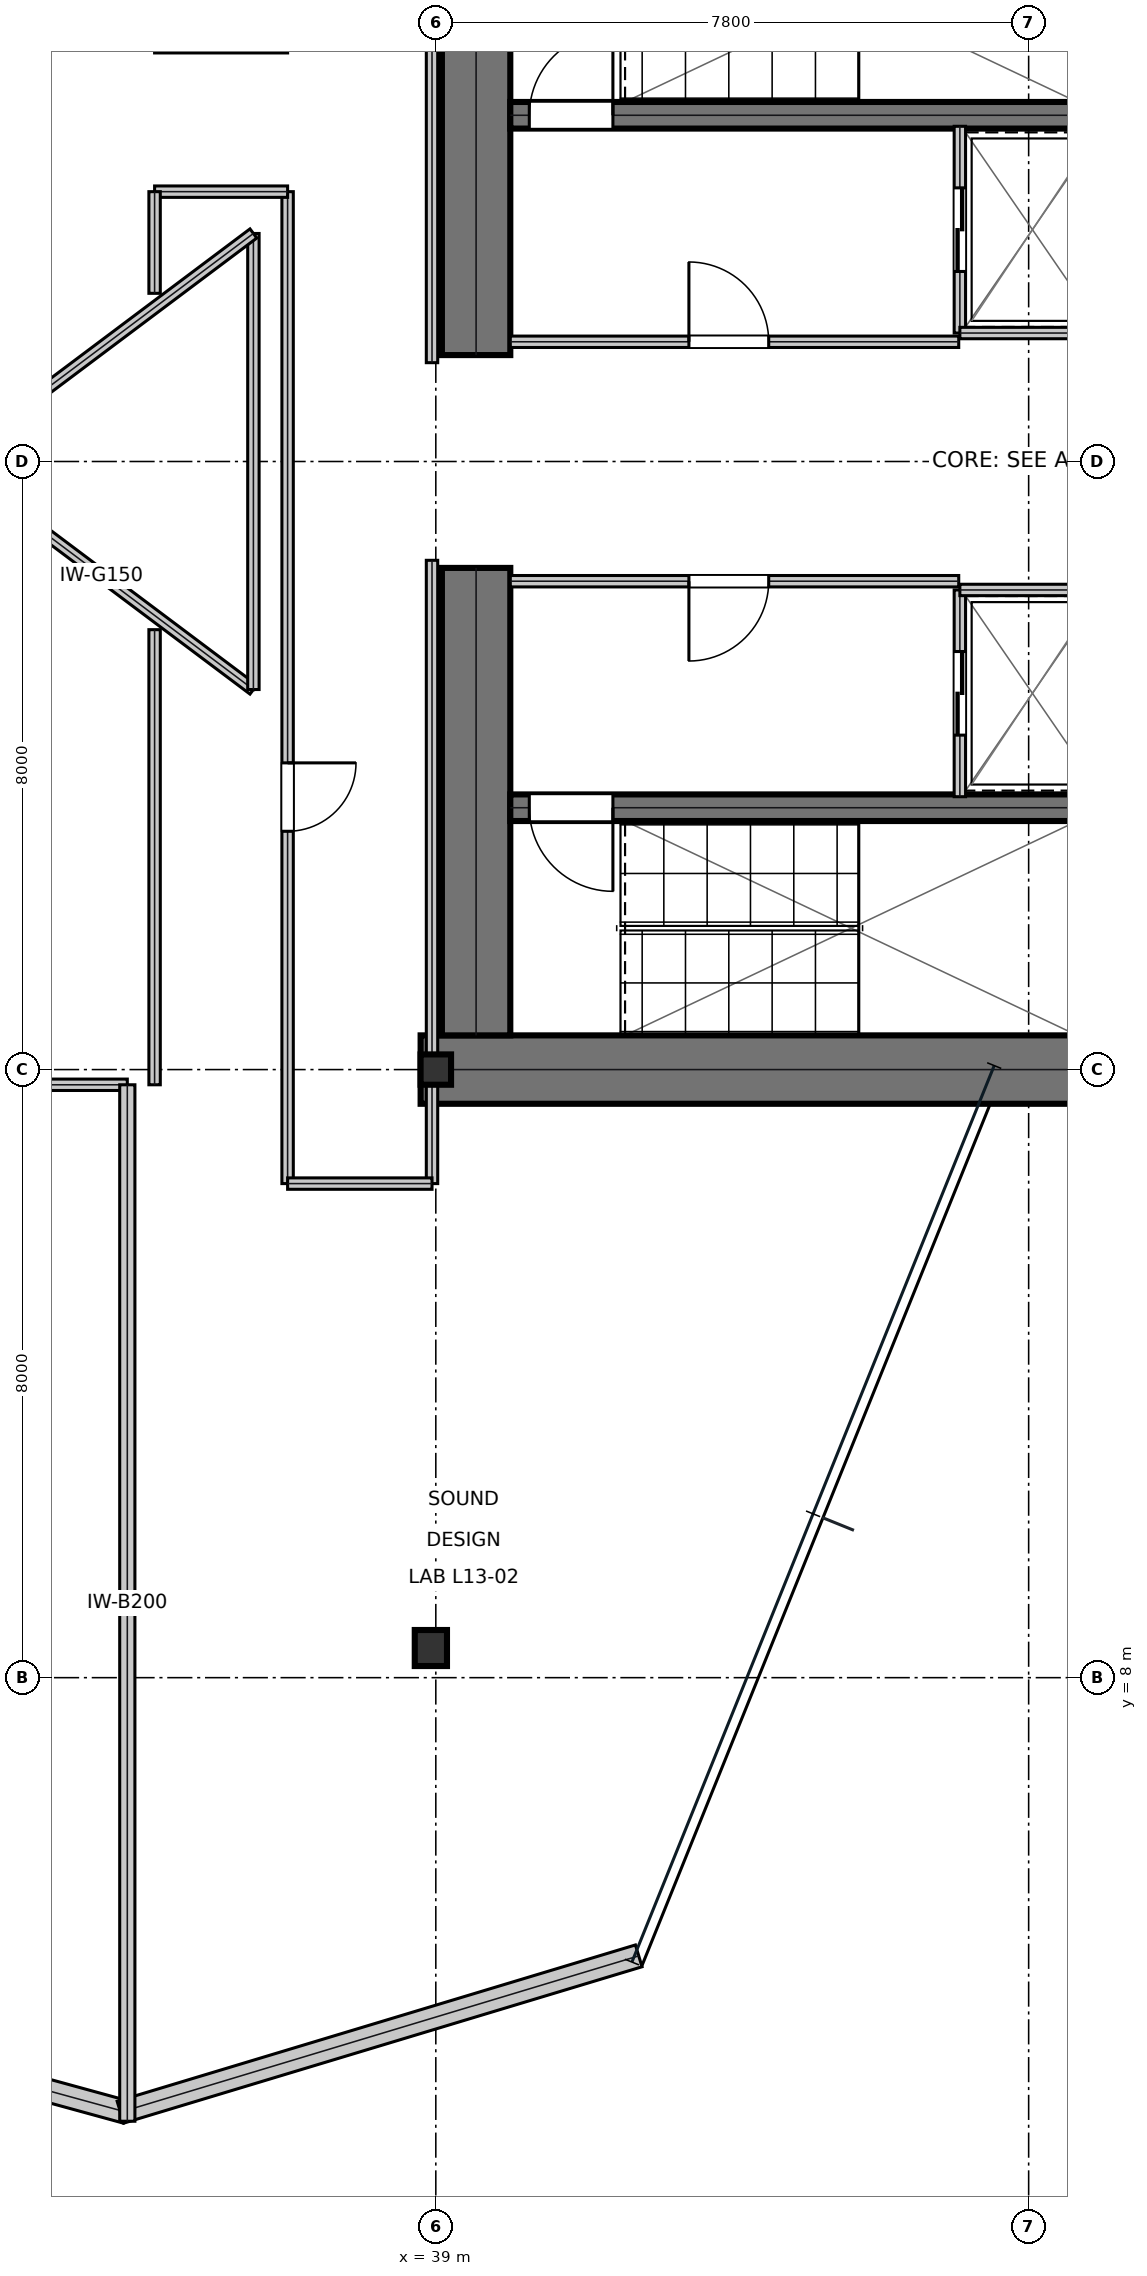
"""IFC4 building model, lengths in metres.
Left out: names, types, materials, properties, quantities, classifications, styles, units other than length and angle.
Written with IfcOpenShell. Run it as: python <this file> out.ifc"""

import sys

from ifc_helpers import new_model, si_unit, direction, frame, frame_2d, origin, origin_2d, place, context, subcontext, project, spatial, rectangle, i_section, extrude, element, fill, save


model = new_model("IFC4")
c1 = context("Model", 3, precision=1e-05, world=origin(), true_north=direction((0.0, 1.0)))
c2 = subcontext(c1, "Body", "Model", "MODEL_VIEW")
j1 = project(units=[si_unit("LENGTHUNIT", "METRE"), si_unit("PLANEANGLEUNIT", "RADIAN")], contexts=[c1])
p1 = place(None, origin())
s1 = spatial("IfcSite", under=j1, at=p1, CompositionType="ELEMENT")
p2 = place(p1, origin())
s2 = spatial("IfcBuilding", under=s1, at=p2, CompositionType="ELEMENT")
p3 = place(p2, frame((0.0, 0.0, 62.1)))
s3 = spatial("IfcBuildingStorey", under=s2, at=p3, CompositionType="ELEMENT", Elevation=62.1)
p4 = place(p3, frame((38.8, 16.0, 0.0), z_axis=(0.0, 0.0, 1.0), x_axis=(1.0, 0.0, 0.0)))
e1 = element("IfcWall", 1, at=p4, inside=s3, PredefinedType="SHEAR", context=c2, shape_type="SweptSolid", body=[
    extrude(rectangle(XDim=16.0, YDim=0.9, at=frame_2d((8.0, 0.0))), origin(), (0.0, 0.0, 1.0), 3.81),
])
for number, where, z_axis, x_axis in (
    (2, (39.53, 16.45, 0.0), (0.0, 0.0, 1.0), (0.0, 1.0, 0.0)),
    (3, (39.53, 25.4, 0.0), (0.0, 0.0, 1.0), (0.0, 1.0, 0.0)),
):
    element("IfcWall", number, at=place(p3, frame(where, z_axis=z_axis, x_axis=x_axis)), inside=s3, PredefinedType="SHEAR", context=c2, shape_type="SweptSolid", body=[
        extrude(rectangle(XDim=6.15, YDim=0.9, at=frame_2d((3.075, 0.0))), origin(), (0.0, 0.0, 1.0), 3.81),
    ])
p5 = place(p3, frame((39.98, 28.555, 0.0), z_axis=(0.0, 0.0, 1.0), x_axis=(1.0, 0.0, 0.0)))
e4 = element("IfcWall", 4, at=p5, inside=s3, PredefinedType="SHEAR", context=c2, shape_type="SweptSolid", body=[
    extrude(rectangle(XDim=7.71, YDim=0.35, at=frame_2d((3.855, 0.0))), origin(), (0.0, 0.0, 1.0), 3.81),
])
p6 = place(p5, frame((0.25, 0.0, 0.0)))
e5 = element("IfcOpeningElement", 5, at=p6, cuts=e4, PredefinedType="OPENING", context=c2, shape_type="SweptSolid", body=[
    extrude(rectangle(XDim=1.1, YDim=2.15, at=frame_2d((0.55, 1.075))), frame((0.0, 0.185, 0.0), z_axis=(0.0, -1.0, 0.0), x_axis=(1.0, 0.0, 0.0)), (0.0, 0.0, 1.0), 0.37),
])
p7 = place(p3, frame((39.98, 19.445, 0.0), z_axis=(0.0, 0.0, 1.0), x_axis=(1.0, 0.0, 0.0)))
e6 = element("IfcWall", 6, at=p7, inside=s3, PredefinedType="SHEAR", context=c2, shape_type="SweptSolid", body=[
    extrude(rectangle(XDim=7.71, YDim=0.35, at=frame_2d((3.855, 0.0))), origin(), (0.0, 0.0, 1.0), 3.81),
])
p8 = place(p7, frame((0.25, 0.0, 0.0)))
e7 = element("IfcOpeningElement", 7, at=p8, cuts=e6, PredefinedType="OPENING", context=c2, shape_type="SweptSolid", body=[
    extrude(rectangle(XDim=1.1, YDim=2.15, at=frame_2d((0.55, 1.075))), frame((0.0, 0.185, 0.0), z_axis=(0.0, -1.0, 0.0), x_axis=(1.0, 0.0, 0.0)), (0.0, 0.0, 1.0), 0.37),
])
p9 = place(p3, frame((39.0, 16.0, 0.0), z_axis=(0.0, 0.0, 1.0), x_axis=(1.0, 0.0, 0.0)))
e8 = element("IfcColumn", 8, at=p9, inside=s3, PredefinedType="COLUMN", context=c2, shape_type="SweptSolid", body=[
    extrude(i_section(OverallWidth=0.401, OverallDepth=0.399, WebThickness=0.025, FlangeThickness=0.04, at=origin_2d()), origin(), (0.0, 0.0, 1.0), 4.044),
])
p10 = place(p3, frame((38.935, 8.39, 0.016), z_axis=(0.0, 0.0, 1.0), x_axis=(1.0, 0.0, 0.0)))
e9 = element("IfcColumn", 9, at=p10, inside=s3, PredefinedType="COLUMN", context=c2, shape_type="SweptSolid", body=[
    extrude(i_section(OverallWidth=0.424, OverallDepth=0.474, WebThickness=0.048, FlangeThickness=0.077, at=origin_2d()), origin(), (0.0, 0.0, 1.0), 4.018),
])
p11 = place(p3, frame((28.109, 4.154, 0.0), z_axis=(0.0, 0.0, 1.0), x_axis=(0.96439075506, -0.264481514581, 0.0)))
e10 = element("IfcWall", 10, at=p11, inside=s3, PredefinedType="STANDARD", context=c2, shape_type="SweptSolid", body=[
    extrude(rectangle(XDim=7.071, YDim=0.3, at=frame_2d((3.535, 0.0))), origin(), (0.0, 0.0, 1.0), 3.81),
])
p12 = place(p3, frame((34.851, 2.283, 0.0), z_axis=(0.0, 0.0, 1.0), x_axis=(0.957387451844, 0.288806625707, 0.0)))
e11 = element("IfcWall", 11, at=p12, inside=s3, PredefinedType="STANDARD", context=c2, shape_type="SweptSolid", body=[
    extrude(rectangle(XDim=7.123, YDim=0.3, at=frame_2d((3.562, 0.0))), origin(), (0.0, 0.0, 1.0), 3.81),
])
p13 = place(p3, frame((39.98, 25.575, 0.0), z_axis=(0.0, 0.0, 1.0), x_axis=(1.0, 0.0, 0.0)))
e12 = element("IfcWall", 12, at=p13, inside=s3, PredefinedType="PARTITIONING", context=c2, shape_type="SweptSolid", body=[
    extrude(rectangle(XDim=5.9, YDim=0.15, at=frame_2d((2.95, 0.0))), origin(), (0.0, 0.0, 1.0), 3.81),
])
p14 = place(p13, frame((2.35, 0.0, 0.0)))
e13 = element("IfcOpeningElement", 13, at=p14, cuts=e12, PredefinedType="OPENING", context=c2, shape_type="SweptSolid", body=[
    extrude(rectangle(XDim=1.05, YDim=2.15, at=frame_2d((0.525, 1.075))), frame((0.0, 0.085, 0.0), z_axis=(0.0, -1.0, 0.0), x_axis=(1.0, 0.0, 0.0)), (0.0, 0.0, 1.0), 0.17),
])
p15 = place(p3, frame((39.98, 22.425, 0.0), z_axis=(0.0, 0.0, 1.0), x_axis=(1.0, 0.0, 0.0)))
e14 = element("IfcWall", 14, at=p15, inside=s3, PredefinedType="PARTITIONING", context=c2, shape_type="SweptSolid", body=[
    extrude(rectangle(XDim=5.9, YDim=0.15, at=frame_2d((2.95, 0.0))), origin(), (0.0, 0.0, 1.0), 3.81),
])
p16 = place(p15, frame((2.35, 0.0, 0.0)))
e15 = element("IfcOpeningElement", 15, at=p16, cuts=e14, PredefinedType="OPENING", context=c2, shape_type="SweptSolid", body=[
    extrude(rectangle(XDim=1.05, YDim=2.15, at=frame_2d((0.525, 1.075))), frame((0.0, 0.085, 0.0), z_axis=(0.0, -1.0, 0.0), x_axis=(1.0, 0.0, 0.0)), (0.0, 0.0, 1.0), 0.17),
])
p17 = place(p3, frame((45.895, 25.69, 0.0), z_axis=(0.0, 0.0, 1.0), x_axis=(0.0, 1.0, 0.0)))
e16 = element("IfcWall", 16, at=p17, inside=s3, PredefinedType="PARTITIONING", context=c2, shape_type="SweptSolid", body=[
    extrude(rectangle(XDim=2.72, YDim=0.15, at=frame_2d((1.36, 0.0))), origin(), (0.0, 0.0, 1.0), 3.81),
])
p18 = place(p17, frame((0.81, 0.0, 0.0)))
e17 = element("IfcOpeningElement", 17, at=p18, cuts=e16, PredefinedType="OPENING", context=c2, shape_type="SweptSolid", body=[
    extrude(rectangle(XDim=1.1, YDim=2.15, at=frame_2d((0.55, 1.075))), frame((0.0, 0.085, 0.0), z_axis=(0.0, -1.0, 0.0), x_axis=(1.0, 0.0, 0.0)), (0.0, 0.0, 1.0), 0.17),
])
p19 = place(p3, frame((45.895, 25.69, 0.0), z_axis=(0.0, 0.0, 1.0), x_axis=(1.0, 0.0, 0.0)))
e18 = element("IfcWall", 18, at=p19, inside=s3, PredefinedType="PARTITIONING", context=c2, shape_type="SweptSolid", body=[
    extrude(rectangle(XDim=1.915, YDim=0.15, at=frame_2d((0.958, 0.0))), origin(), (0.0, 0.0, 1.0), 3.81),
])
p20 = place(p3, frame((45.895, 19.59, 0.0), z_axis=(0.0, 0.0, 1.0), x_axis=(0.0, 1.0, 0.0)))
e19 = element("IfcWall", 19, at=p20, inside=s3, PredefinedType="PARTITIONING", context=c2, shape_type="SweptSolid", body=[
    extrude(rectangle(XDim=2.72, YDim=0.15, at=frame_2d((1.36, 0.0))), origin(), (0.0, 0.0, 1.0), 3.81),
])
p21 = place(p20, frame((0.81, 0.0, 0.0)))
e20 = element("IfcOpeningElement", 20, at=p21, cuts=e19, PredefinedType="OPENING", context=c2, shape_type="SweptSolid", body=[
    extrude(rectangle(XDim=1.1, YDim=2.15, at=frame_2d((0.55, 1.075))), frame((0.0, 0.085, 0.0), z_axis=(0.0, -1.0, 0.0), x_axis=(1.0, 0.0, 0.0)), (0.0, 0.0, 1.0), 0.17),
])
p22 = place(p3, frame((45.895, 22.31, 0.0), z_axis=(0.0, 0.0, 1.0), x_axis=(1.0, 0.0, 0.0)))
e21 = element("IfcWall", 21, at=p22, inside=s3, PredefinedType="PARTITIONING", context=c2, shape_type="SweptSolid", body=[
    extrude(rectangle(XDim=1.915, YDim=0.15, at=frame_2d((0.958, 0.0))), origin(), (0.0, 0.0, 1.0), 3.81),
])
p23 = place(p3, frame((37.05, 14.5, 0.0), z_axis=(0.0, 0.0, 1.0), x_axis=(0.0, 1.0, 0.0)))
e22 = element("IfcWall", 22, at=p23, inside=s3, PredefinedType="PARTITIONING", context=c2, shape_type="SweptSolid", body=[
    extrude(rectangle(XDim=13.05, YDim=0.15, at=frame_2d((6.525, 0.0))), origin(), (0.0, 0.0, 1.0), 3.181),
])
p24 = place(p23, frame((4.635, 0.0, 0.0)))
e23 = element("IfcOpeningElement", 23, at=p24, cuts=e22, PredefinedType="OPENING", context=c2, shape_type="SweptSolid", body=[
    extrude(rectangle(XDim=0.9, YDim=2.15, at=frame_2d((0.45, 1.075))), frame((0.0, 0.085, 0.0), z_axis=(0.0, -1.0, 0.0), x_axis=(1.0, 0.0, 0.0)), (0.0, 0.0, 1.0), 0.17),
])
p25 = place(p3, frame((33.4, 15.8, 0.0), z_axis=(0.0, 0.0, 1.0), x_axis=(1.0, 0.0, 0.0)))
e24 = element("IfcWall", 24, at=p25, inside=s3, PredefinedType="PARTITIONING", context=c2, shape_type="SweptSolid", body=[
    extrude(rectangle(XDim=1.541, YDim=0.15, at=frame_2d((0.771, 0.0))), origin(), (0.0, 0.0, 1.0), 3.181),
])
p26 = place(p3, frame((38.95, 14.5, 0.0), z_axis=(0.0, 0.0, 1.0), x_axis=(0.0, 1.0, 0.0)))
e25 = element("IfcWall", 25, at=p26, inside=s3, PredefinedType="PARTITIONING", context=c2, shape_type="SweptSolid", body=[
    extrude(rectangle(XDim=8.2, YDim=0.15, at=frame_2d((4.1, 0.0))), origin(), (0.0, 0.0, 1.0), 3.181),
])
p27 = place(p3, frame((35.3, 15.8, 0.0), z_axis=(0.0, 0.0, 1.0), x_axis=(0.0, 1.0, 0.0)))
e26 = element("IfcWall", 26, at=p27, inside=s3, PredefinedType="PARTITIONING", context=c2, shape_type="SweptSolid", body=[
    extrude(rectangle(XDim=5.988, YDim=0.15, at=frame_2d((2.994, 0.0))), origin(), (0.0, 0.0, 1.0), 3.181),
])
p28 = place(p3, frame((37.05, 14.5, 0.0), z_axis=(0.0, 0.0, 1.0), x_axis=(1.0, 0.0, 0.0)))
e27 = element("IfcWall", 27, at=p28, inside=s3, PredefinedType="PARTITIONING", context=c2, shape_type="SweptSolid", body=[
    extrude(rectangle(XDim=1.9, YDim=0.15, at=frame_2d((0.95, 0.0))), origin(), (0.0, 0.0, 1.0), 3.81),
])
p29 = place(p3, frame((35.3, 27.55, 0.0), z_axis=(0.0, 0.0, 1.0), x_axis=(1.0, 0.0, 0.0)))
e28 = element("IfcWall", 28, at=p29, inside=s3, PredefinedType="PARTITIONING", context=c2, shape_type="SweptSolid", body=[
    extrude(rectangle(XDim=1.75, YDim=0.15, at=frame_2d((0.875, 0.0))), origin(), (0.0, 0.0, 1.0), 3.391),
])
p30 = place(p3, frame((35.3, 26.212, 0.0), z_axis=(0.0, 0.0, 1.0), x_axis=(0.0, 1.0, 0.0)))
e29 = element("IfcWall", 29, at=p30, inside=s3, PredefinedType="PARTITIONING", context=c2, shape_type="SweptSolid", body=[
    extrude(rectangle(XDim=1.338, YDim=0.15, at=frame_2d((0.669, 0.0))), origin(), (0.0, 0.0, 1.0), 3.81),
])
p31 = place(p3, frame((38.95, 25.3, 0.0), z_axis=(0.0, 0.0, 1.0), x_axis=(0.0, 1.0, 0.0)))
e30 = element("IfcWall", 30, at=p31, inside=s3, PredefinedType="PARTITIONING", context=c2, shape_type="SweptSolid", body=[
    extrude(rectangle(XDim=8.2, YDim=0.15, at=frame_2d((4.1, 0.0))), origin(), (0.0, 0.0, 1.0), 3.181),
])
p32 = place(p3, frame((35.3, 29.45, 0.0), z_axis=(0.0, 0.0, 1.0), x_axis=(1.0, 0.0, 0.0)))
e31 = element("IfcWall", 31, at=p32, inside=s3, PredefinedType="PARTITIONING", context=c2, shape_type="SweptSolid", body=[
    extrude(rectangle(XDim=1.75, YDim=0.15, at=frame_2d((0.875, 0.0))), origin(), (0.0, 0.0, 1.0), 3.81),
])
p33 = place(p3, frame((34.941, 2.164, 0.0), z_axis=(0.0, 0.0, 1.0), x_axis=(0.0, 1.0, 0.0)))
e32 = element("IfcWall", 32, at=p33, inside=s3, PredefinedType="SOLIDWALL", context=c2, shape_type="SweptSolid", body=[
    extrude(rectangle(XDim=13.636, YDim=0.2, at=frame_2d((6.818, 0.0))), origin(), (0.0, 0.0, 1.0), 3.338),
])
p34 = place(p3, frame((32.6, 24.0, 0.0), z_axis=(0.0, 0.0, 1.0), x_axis=(0.8, -0.6, 0.0)))
e33 = element("IfcWall", 33, at=p34, inside=s3, PredefinedType="MOVABLE", context=c2, shape_type="SweptSolid", body=[
    extrude(rectangle(XDim=5.0, YDim=0.15, at=frame_2d((2.5, 0.0))), origin(), (0.0, 0.0, 1.0), 3.81),
])
p35 = place(p3, frame((36.6, 21.0, 0.0), z_axis=(0.0, 0.0, 1.0), x_axis=(0.0, 1.0, 0.0)))
e34 = element("IfcWall", 34, at=p35, inside=s3, PredefinedType="MOVABLE", context=c2, shape_type="SweptSolid", body=[
    extrude(rectangle(XDim=6.0, YDim=0.15, at=frame_2d((3.0, 0.0))), origin(), (0.0, 0.0, 1.0), 3.81),
])
p36 = place(p3, frame((36.6, 27.0, 0.0), z_axis=(0.0, 0.0, 1.0), x_axis=(-0.8, -0.6, 0.0)))
e35 = element("IfcWall", 35, at=p36, inside=s3, PredefinedType="MOVABLE", context=c2, shape_type="SweptSolid", body=[
    extrude(rectangle(XDim=5.0, YDim=0.15, at=frame_2d((2.5, 0.0))), origin(), (0.0, 0.0, 1.0), 3.81),
])
p37 = place(p14, origin())
e36 = element("IfcDoor", 36, at=p37, inside=s3, OperationType="SINGLE_SWING_LEFT", PredefinedType="DOOR", context=c2, shape_type="SweptSolid", body=[
    extrude(rectangle(XDim=1.05, YDim=2.15, at=frame_2d((0.525, 1.075))), frame((0.0, 0.025, 0.0), z_axis=(0.0, -1.0, 0.0), x_axis=(1.0, 0.0, 0.0)), (0.0, 0.0, 1.0), 0.05),
])
fill(e13, e36)
p38 = place(p16, frame((1.05, 0.0, 0.0), z_axis=(0.0, 0.0, 1.0), x_axis=(-1.0, 0.0, 0.0)))
e37 = element("IfcDoor", 37, at=p38, inside=s3, OperationType="SINGLE_SWING_RIGHT", PredefinedType="DOOR", context=c2, shape_type="SweptSolid", body=[
    extrude(rectangle(XDim=1.05, YDim=2.15, at=frame_2d((0.525, 1.075))), frame((0.0, 0.025, 0.0), z_axis=(0.0, -1.0, 0.0), x_axis=(1.0, 0.0, 0.0)), (0.0, 0.0, 1.0), 0.05),
])
fill(e15, e37)
p39 = place(p18, frame((1.1, 0.0, 0.0), z_axis=(0.0, 0.0, 1.0), x_axis=(-1.0, 0.0, 0.0)))
e38 = element("IfcDoor", 38, at=p39, inside=s3, OperationType="DOUBLE_DOOR_SLIDING", PredefinedType="DOOR", context=c2, shape_type="SweptSolid", body=[
    extrude(rectangle(XDim=1.1, YDim=2.15, at=frame_2d((0.55, 1.075))), frame((0.0, 0.025, 0.0), z_axis=(0.0, -1.0, 0.0), x_axis=(1.0, 0.0, 0.0)), (0.0, 0.0, 1.0), 0.05),
])
fill(e17, e38)
p40 = place(p21, frame((1.1, 0.0, 0.0), z_axis=(0.0, 0.0, 1.0), x_axis=(-1.0, 0.0, 0.0)))
e39 = element("IfcDoor", 39, at=p40, inside=s3, OperationType="DOUBLE_DOOR_SLIDING", PredefinedType="DOOR", context=c2, shape_type="SweptSolid", body=[
    extrude(rectangle(XDim=1.1, YDim=2.15, at=frame_2d((0.55, 1.075))), frame((0.0, 0.025, 0.0), z_axis=(0.0, -1.0, 0.0), x_axis=(1.0, 0.0, 0.0)), (0.0, 0.0, 1.0), 0.05),
])
fill(e20, e39)
p41 = place(p24, frame((0.9, 0.0, 0.0), z_axis=(0.0, 0.0, 1.0), x_axis=(-1.0, 0.0, 0.0)))
e40 = element("IfcDoor", 40, at=p41, inside=s3, OperationType="SINGLE_SWING_LEFT", PredefinedType="DOOR", context=c2, shape_type="SweptSolid", body=[
    extrude(rectangle(XDim=0.9, YDim=2.15, at=frame_2d((0.45, 1.075))), frame((0.0, 0.025, 0.0), z_axis=(0.0, -1.0, 0.0), x_axis=(1.0, 0.0, 0.0)), (0.0, 0.0, 1.0), 0.05),
])
fill(e23, e40)
p42 = place(p6, origin())
e41 = element("IfcDoor", 41, at=p42, inside=s3, OperationType="SINGLE_SWING_RIGHT", PredefinedType="DOOR", context=c2, shape_type="SweptSolid", body=[
    extrude(rectangle(XDim=1.1, YDim=2.15, at=frame_2d((0.55, 1.075))), frame((0.0, 0.025, 0.0), z_axis=(0.0, -1.0, 0.0), x_axis=(1.0, 0.0, 0.0)), (0.0, 0.0, 1.0), 0.05),
])
fill(e5, e41)
p43 = place(p8, frame((1.1, 0.0, 0.0), z_axis=(0.0, 0.0, 1.0), x_axis=(-1.0, 0.0, 0.0)))
e42 = element("IfcDoor", 42, at=p43, inside=s3, OperationType="SINGLE_SWING_LEFT", PredefinedType="DOOR", context=c2, shape_type="SweptSolid", body=[
    extrude(rectangle(XDim=1.1, YDim=2.15, at=frame_2d((0.55, 1.075))), frame((0.0, 0.025, 0.0), z_axis=(0.0, -1.0, 0.0), x_axis=(1.0, 0.0, 0.0)), (0.0, 0.0, 1.0), 0.05),
])
fill(e7, e42)
save(model, sys.argv[1])
